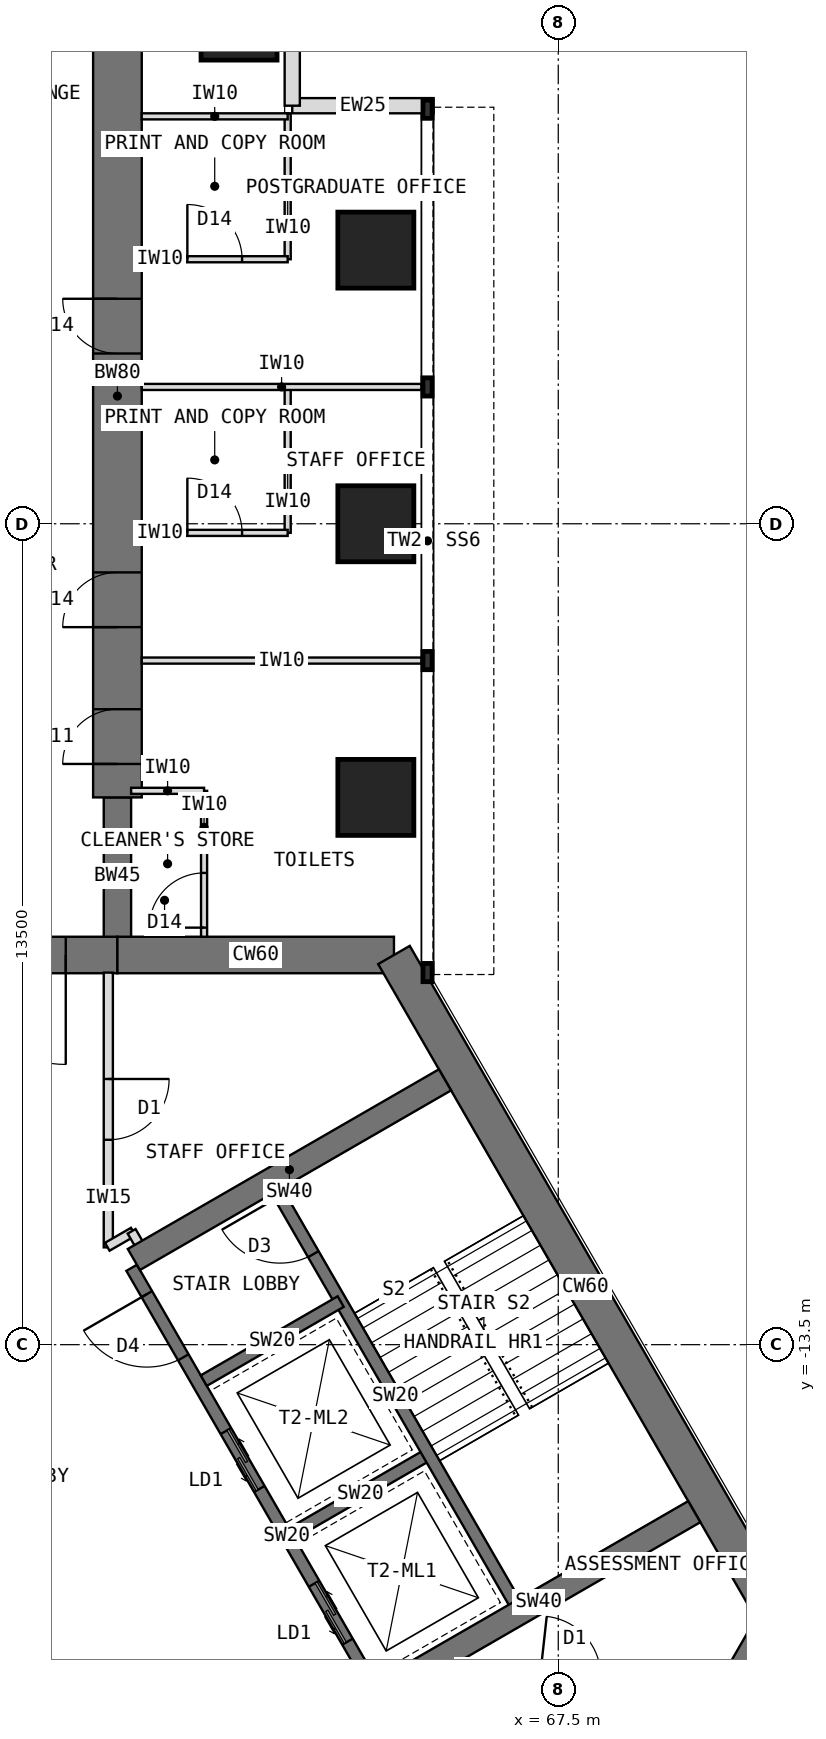
"""IFC4 building model, lengths in metres.
Left out: names, types, materials, properties, quantities, classifications, styles, units other than length and angle.
Written with IfcOpenShell. Run it as: python <this file> out.ifc"""

import sys

from ifc_helpers import new_model, si_unit, direction, frame, frame_2d, origin, origin_2d, place, context, subcontext, project, spatial, rectangle, extrude, element, fill, save


model = new_model("IFC4")
c1 = context("Model", 3, precision=1e-05, world=origin(), true_north=direction((0.0, 1.0)))
c2 = subcontext(c1, "Body", "Model", "MODEL_VIEW")
j1 = project(units=[si_unit("LENGTHUNIT", "METRE"), si_unit("PLANEANGLEUNIT", "RADIAN")], contexts=[c1])
p1 = place(None, origin())
s1 = spatial("IfcSite", under=j1, at=p1, CompositionType="ELEMENT")
p2 = place(p1, origin())
s2 = spatial("IfcBuilding", under=s1, at=p2, CompositionType="ELEMENT")
p3 = place(p2, frame((0.0, 0.0, 145.5)))
s3 = spatial("IfcBuildingStorey", under=s2, at=p3, CompositionType="ELEMENT", Elevation=145.5)
p4 = place(p3, frame((64.798, -7.092, 0.0), z_axis=(0.0, 0.0, 1.0), x_axis=(-1.0, 0.0, 0.0)))
e1 = element("IfcWall", 1, at=p4, inside=s3, PredefinedType="SHEAR", context=c2, shape_type="SweptSolid", body=[
    extrude(rectangle(XDim=4.548, YDim=0.6, at=frame_2d((2.274, 0.0))), origin(), (0.0, 0.0, 1.0), 4.0),
])
p5 = place(p3, frame((60.25, -7.092, 0.0), z_axis=(0.0, 0.0, 1.0), x_axis=(-1.0, 0.0, 0.0)))
e2 = element("IfcWall", 2, at=p5, inside=s3, PredefinedType="SHEAR", context=c2, shape_type="SweptSolid", body=[
    extrude(rectangle(XDim=3.5, YDim=0.6, at=frame_2d((1.75, 0.0))), origin(), (0.0, 0.0, 1.0), 4.0),
])
p6 = place(p5, frame((0.85, 0.0, 0.0)))
e3 = element("IfcOpeningElement", 3, at=p6, cuts=e2, PredefinedType="OPENING", context=c2, shape_type="SweptSolid", body=[
    extrude(rectangle(XDim=1.8, YDim=2.1, at=frame_2d((0.9, 1.05))), frame((0.0, 0.31, 0.0), z_axis=(0.0, -1.0, 0.0), x_axis=(1.0, 0.0, 0.0)), (0.0, 0.0, 1.0), 0.62),
])
p7 = place(p3, frame((68.822, -21.939, 0.0), z_axis=(0.0, 0.0, 1.0), x_axis=(0.500024481964, 0.866011268655, 0.0)))
e4 = element("IfcWall", 4, at=p7, inside=s3, PredefinedType="SHEAR", context=c2, shape_type="SweptSolid", body=[
    extrude(rectangle(XDim=4.548, YDim=0.6, at=frame_2d((2.274, 0.0))), origin(), (0.0, 0.0, 1.0), 4.0),
])
p8 = place(p3, frame((71.096, -18.0, 0.0), z_axis=(0.0, 0.0, 1.0), x_axis=(-0.500005998175, 0.866021940709, 0.0)))
e5 = element("IfcWall", 5, at=p8, inside=s3, PredefinedType="SHEAR", context=c2, shape_type="SweptSolid", body=[
    extrude(rectangle(XDim=12.596, YDim=0.6, at=frame_2d((6.298, 0.0))), origin(), (0.0, 0.0, 1.0), 4.0),
])
p9 = place(p3, frame((60.25, -7.092, 0.0), z_axis=(0.0, 0.0, 1.0), x_axis=(0.0, 1.0, 0.0)))
e6 = element("IfcWall", 6, at=p9, inside=s3, PredefinedType="SHEAR", context=c2, shape_type="SweptSolid", body=[
    extrude(rectangle(XDim=2.592, YDim=0.45, at=frame_2d((1.296, 0.0))), origin(), (0.0, 0.0, 1.0), 4.0),
])
p10 = place(p3, frame((60.25, -4.5, 0.0), z_axis=(0.0, 0.0, 1.0), x_axis=(0.0, 1.0, 0.0)))
e7 = element("IfcWall", 7, at=p10, inside=s3, PredefinedType="SHEAR", context=c2, shape_type="SweptSolid", body=[
    extrude(rectangle(XDim=13.2, YDim=0.8, at=frame_2d((6.6, 0.0))), origin(), (0.0, 0.0, 1.0), 4.0),
])
p11 = place(p10, frame((0.55, 0.0, 0.0)))
e8 = element("IfcOpeningElement", 8, at=p11, cuts=e7, PredefinedType="OPENING", context=c2, shape_type="SweptSolid", body=[
    extrude(rectangle(XDim=0.9, YDim=2.1, at=frame_2d((0.45, 1.05))), frame((0.0, 0.41, 0.0), z_axis=(0.0, -1.0, 0.0), x_axis=(1.0, 0.0, 0.0)), (0.0, 0.0, 1.0), 0.82),
])
p12 = place(p10, frame((2.8, 0.0, 0.0)))
e9 = element("IfcOpeningElement", 9, at=p12, cuts=e7, PredefinedType="OPENING", context=c2, shape_type="SweptSolid", body=[
    extrude(rectangle(XDim=0.9, YDim=2.1, at=frame_2d((0.45, 1.05))), frame((0.0, 0.41, 0.0), z_axis=(0.0, -1.0, 0.0), x_axis=(1.0, 0.0, 0.0)), (0.0, 0.0, 1.0), 0.82),
])
p13 = place(p10, frame((7.3, 0.0, 0.0)))
e10 = element("IfcOpeningElement", 10, at=p13, cuts=e7, PredefinedType="OPENING", context=c2, shape_type="SweptSolid", body=[
    extrude(rectangle(XDim=0.9, YDim=2.1, at=frame_2d((0.45, 1.05))), frame((0.0, 0.41, 0.0), z_axis=(0.0, -1.0, 0.0), x_axis=(1.0, 0.0, 0.0)), (0.0, 0.0, 1.0), 0.82),
])
for number, where, z_axis, x_axis in (
    (11, (64.5, -4.5, 0.0), (0.0, 0.0, 1.0), (1.0, 0.0, 0.0)),
    (12, (64.5, 0.0, 0.0), (0.0, 0.0, 1.0), (1.0, 0.0, 0.0)),
    (13, (64.5, 4.5, 0.0), (0.0, 0.0, 1.0), (1.0, 0.0, 0.0)),
    (14, (62.25, 8.25, 0.0), (0.0, 0.0, 1.0), (1.0, 0.0, 0.0)),
):
    element("IfcColumn", number, at=place(p3, frame(where, z_axis=z_axis, x_axis=x_axis)), inside=s3, PredefinedType="COLUMN", context=c2, shape_type="SweptSolid", body=[
        extrude(rectangle(XDim=1.25, YDim=1.25, at=origin_2d()), origin(), (0.0, 0.0, 1.0), 4.0),
    ])
for number, where, z_axis, x_axis in (
    (15, (65.45, 6.875, 0.0), (0.0, 0.0, 1.0), (-1.0, 0.0, 0.0)),
    (16, (63.125, 6.875, 0.0), (0.0, 0.0, 1.0), (0.0, 1.0, 0.0)),
):
    element("IfcWall", number, at=place(p3, frame(where, z_axis=z_axis, x_axis=x_axis)), inside=s3, PredefinedType="STANDARD", context=c2, shape_type="SweptSolid", body=[
        extrude(rectangle(XDim=2.325, YDim=0.25, at=frame_2d((1.163, 0.0))), origin(), (0.0, 0.0, 1.0), 3.8),
    ])
p14 = place(p3, frame((64.484, -19.164, 0.0), z_axis=(0.0, 0.0, 1.0), x_axis=(-0.49999894854, 0.866026010844, 0.0)))
e17 = element("IfcWall", 17, at=p14, inside=s3, PredefinedType="SHEAR", context=c2, shape_type="SweptSolid", body=[
    extrude(rectangle(XDim=8.0, YDim=0.2, at=frame_2d((4.0, 0.0))), origin(), (0.0, 0.0, 1.0), 4.0),
])
p15 = place(p14, frame((6.3, 0.0, 0.0)))
e18 = element("IfcOpeningElement", 18, at=p15, cuts=e17, PredefinedType="OPENING", context=c2, shape_type="SweptSolid", body=[
    extrude(rectangle(XDim=1.2, YDim=2.1, at=frame_2d((0.6, 1.05))), frame((0.0, 0.11, 0.0), z_axis=(0.0, -1.0, 0.0), x_axis=(1.0, 0.0, 0.0)), (0.0, 0.0, 1.0), 0.22),
])
p16 = place(p14, frame((0.9, 0.0, 0.0)))
e19 = element("IfcOpeningElement", 19, at=p16, cuts=e17, PredefinedType="OPENING", context=c2, shape_type="SweptSolid", body=[
    extrude(rectangle(XDim=1.1, YDim=2.2, at=frame_2d((0.55, 1.1))), frame((0.0, 0.11, 0.0), z_axis=(0.0, -1.0, 0.0), x_axis=(1.0, 0.0, 0.0)), (0.0, 0.0, 1.0), 0.22),
])
p17 = place(p14, frame((3.8, 0.0, 0.0)))
e20 = element("IfcOpeningElement", 20, at=p17, cuts=e17, PredefinedType="OPENING", context=c2, shape_type="SweptSolid", body=[
    extrude(rectangle(XDim=1.1, YDim=2.2, at=frame_2d((0.55, 1.1))), frame((0.0, 0.11, 0.0), z_axis=(0.0, -1.0, 0.0), x_axis=(1.0, 0.0, 0.0)), (0.0, 0.0, 1.0), 0.22),
])
p18 = place(p3, frame((63.12, -16.603, 0.0), z_axis=(0.0, 0.0, 1.0), x_axis=(0.866062058628, 0.499936506574, 0.0)))
e21 = element("IfcWall", 21, at=p18, inside=s3, PredefinedType="SHEAR", context=c2, shape_type="SweptSolid", body=[
    extrude(rectangle(XDim=2.6, YDim=0.2, at=frame_2d((1.3, 0.0))), origin(), (0.0, 0.0, 1.0), 4.0),
])
p19 = place(p3, frame((61.67, -14.091, 0.0), z_axis=(0.0, 0.0, 1.0), x_axis=(0.86603858612, 0.49997716683, 0.0)))
e22 = element("IfcWall", 22, at=p19, inside=s3, PredefinedType="SHEAR", context=c2, shape_type="SweptSolid", body=[
    extrude(rectangle(XDim=2.6, YDim=0.2, at=frame_2d((1.3, 0.0))), origin(), (0.0, 0.0, 1.0), 4.0),
])
p20 = place(p3, frame((66.822, -17.814, 0.0), z_axis=(0.0, 0.0, 1.0), x_axis=(-0.49999894854, 0.866026010844, 0.0)))
e23 = element("IfcWall", 23, at=p20, inside=s3, PredefinedType="SHEAR", context=c2, shape_type="SweptSolid", body=[
    extrude(rectangle(XDim=8.0, YDim=0.2, at=frame_2d((4.0, 0.0))), origin(), (0.0, 0.0, 1.0), 4.0),
])
p21 = place(p20, frame((6.7, 0.0, 0.0)))
e24 = element("IfcOpeningElement", 24, at=p21, cuts=e23, PredefinedType="OPENING", context=c2, shape_type="SweptSolid", body=[
    extrude(rectangle(XDim=1.1, YDim=2.1, at=frame_2d((0.55, 1.05))), frame((0.0, 0.11, 0.0), z_axis=(0.0, -1.0, 0.0), x_axis=(1.0, 0.0, 0.0)), (0.0, 0.0, 1.0), 0.22),
])
p22 = place(p3, frame((60.52, -12.099, 0.0), z_axis=(0.0, 0.0, 1.0), x_axis=(0.866009424208, 0.500027676417, 0.0)))
e25 = element("IfcWall", 25, at=p22, inside=s3, PredefinedType="SHEAR", context=c2, shape_type="SweptSolid", body=[
    extrude(rectangle(XDim=5.908, YDim=0.4, at=frame_2d((2.954, 0.0))), origin(), (0.0, 0.0, 1.0), 4.0),
])
p23 = place(p3, frame((64.62, -19.201, 0.0), z_axis=(0.0, 0.0, 1.0), x_axis=(0.866027317282, 0.49999668571, 0.0)))
e26 = element("IfcWall", 26, at=p23, inside=s3, PredefinedType="SHEAR", context=c2, shape_type="SweptSolid", body=[
    extrude(rectangle(XDim=5.908, YDim=0.4, at=frame_2d((2.954, 0.0))), origin(), (0.0, 0.0, 1.0), 4.0),
])
for number, where, z_axis, x_axis in (
    (27, (60.65, -2.25, 0.0), (0.0, 0.0, 1.0), (1.0, 0.0, 0.0)),
    (28, (60.65, 2.25, 0.0), (0.0, 0.0, 1.0), (1.0, 0.0, 0.0)),
):
    element("IfcWall", number, at=place(p3, frame(where, z_axis=z_axis, x_axis=x_axis)), inside=s3, PredefinedType="PARTITIONING", context=c2, shape_type="SweptSolid", body=[
        extrude(rectangle(XDim=4.6, YDim=0.1, at=frame_2d((2.3, 0.0))), origin(), (0.0, 0.0, 1.0), 3.8),
    ])
p24 = place(p3, frame((63.05, -0.15, 0.0), z_axis=(0.0, 0.0, 1.0), x_axis=(0.0, 1.0, 0.0)))
e29 = element("IfcWall", 29, at=p24, inside=s3, PredefinedType="PARTITIONING", context=c2, shape_type="SweptSolid", body=[
    extrude(rectangle(XDim=2.4, YDim=0.1, at=frame_2d((1.2, 0.0))), origin(), (0.0, 0.0, 1.0), 3.8),
])
p25 = place(p3, frame((60.65, -0.15, 0.0), z_axis=(0.0, 0.0, 1.0), x_axis=(1.0, 0.0, 0.0)))
e30 = element("IfcWall", 30, at=p25, inside=s3, PredefinedType="PARTITIONING", context=c2, shape_type="SweptSolid", body=[
    extrude(rectangle(XDim=2.4, YDim=0.1, at=frame_2d((1.2, 0.0))), origin(), (0.0, 0.0, 1.0), 3.8),
])
p26 = place(p25, frame((0.75, 0.0, 0.0)))
e31 = element("IfcOpeningElement", 31, at=p26, cuts=e30, PredefinedType="OPENING", context=c2, shape_type="SweptSolid", body=[
    extrude(rectangle(XDim=0.9, YDim=2.1, at=frame_2d((0.45, 1.05))), frame((0.0, 0.06, 0.0), z_axis=(0.0, -1.0, 0.0), x_axis=(1.0, 0.0, 0.0)), (0.0, 0.0, 1.0), 0.12),
])
p27 = place(p3, frame((63.05, 4.35, 0.0), z_axis=(0.0, 0.0, 1.0), x_axis=(0.0, 1.0, 0.0)))
e32 = element("IfcWall", 32, at=p27, inside=s3, PredefinedType="PARTITIONING", context=c2, shape_type="SweptSolid", body=[
    extrude(rectangle(XDim=2.4, YDim=0.1, at=frame_2d((1.2, 0.0))), origin(), (0.0, 0.0, 1.0), 3.8),
])
p28 = place(p3, frame((60.65, 4.35, 0.0), z_axis=(0.0, 0.0, 1.0), x_axis=(1.0, 0.0, 0.0)))
e33 = element("IfcWall", 33, at=p28, inside=s3, PredefinedType="PARTITIONING", context=c2, shape_type="SweptSolid", body=[
    extrude(rectangle(XDim=2.4, YDim=0.1, at=frame_2d((1.2, 0.0))), origin(), (0.0, 0.0, 1.0), 3.8),
])
p29 = place(p28, frame((0.75, 0.0, 0.0)))
e34 = element("IfcOpeningElement", 34, at=p29, cuts=e33, PredefinedType="OPENING", context=c2, shape_type="SweptSolid", body=[
    extrude(rectangle(XDim=0.9, YDim=2.1, at=frame_2d((0.45, 1.05))), frame((0.0, 0.06, 0.0), z_axis=(0.0, -1.0, 0.0), x_axis=(1.0, 0.0, 0.0)), (0.0, 0.0, 1.0), 0.12),
])
p30 = place(p3, frame((60.65, 6.7, 0.0), z_axis=(0.0, 0.0, 1.0), x_axis=(1.0, 0.0, 0.0)))
e35 = element("IfcWall", 35, at=p30, inside=s3, PredefinedType="PARTITIONING", context=c2, shape_type="SweptSolid", body=[
    extrude(rectangle(XDim=2.4, YDim=0.1, at=frame_2d((1.2, 0.0))), origin(), (0.0, 0.0, 1.0), 3.8),
])
p31 = place(p3, frame((61.675, -6.792, 0.0), z_axis=(0.0, 0.0, 1.0), x_axis=(0.0, 1.0, 0.0)))
e36 = element("IfcWall", 36, at=p31, inside=s3, PredefinedType="PARTITIONING", context=c2, shape_type="SweptSolid", body=[
    extrude(rectangle(XDim=2.4, YDim=0.1, at=frame_2d((1.2, 0.0))), origin(), (0.0, 0.0, 1.0), 3.8),
])
p32 = place(p31, frame((0.15, 0.0, 0.0)))
e37 = element("IfcOpeningElement", 37, at=p32, cuts=e36, PredefinedType="OPENING", context=c2, shape_type="SweptSolid", body=[
    extrude(rectangle(XDim=0.9, YDim=2.1, at=frame_2d((0.45, 1.05))), frame((0.0, 0.06, 0.0), z_axis=(0.0, -1.0, 0.0), x_axis=(1.0, 0.0, 0.0)), (0.0, 0.0, 1.0), 0.12),
])
p33 = place(p3, frame((60.475, -4.392, 0.0), z_axis=(0.0, 0.0, 1.0), x_axis=(1.0, 0.0, 0.0)))
e38 = element("IfcWall", 38, at=p33, inside=s3, PredefinedType="PARTITIONING", context=c2, shape_type="SweptSolid", body=[
    extrude(rectangle(XDim=1.2, YDim=0.1, at=frame_2d((0.6, 0.0))), origin(), (0.0, 0.0, 1.0), 3.8),
])
p34 = place(p3, frame((60.1, -7.382, 0.0), z_axis=(0.0, 0.0, 1.0), x_axis=(0.0, -1.0, 0.0)))
e39 = element("IfcWall", 39, at=p34, inside=s3, PredefinedType="PARTITIONING", context=c2, shape_type="SweptSolid", body=[
    extrude(rectangle(XDim=4.519, YDim=0.15, at=frame_2d((2.259, 0.0))), origin(), (0.0, 0.0, 1.0), 3.8),
])
p35 = place(p34, frame((1.749, 0.0, 0.0)))
e40 = element("IfcOpeningElement", 40, at=p35, cuts=e39, PredefinedType="OPENING", context=c2, shape_type="SweptSolid", body=[
    extrude(rectangle(XDim=1.0, YDim=2.1, at=frame_2d((0.5, 1.05))), frame((0.0, 0.085, 0.0), z_axis=(0.0, -1.0, 0.0), x_axis=(1.0, 0.0, 0.0)), (0.0, 0.0, 1.0), 0.17),
])
p36 = place(p3, frame((60.083, -11.89, 0.0), z_axis=(0.0, 0.0, 1.0), x_axis=(0.865831790172, 0.50033519877, 0.0)))
e41 = element("IfcWall", 41, at=p36, inside=s3, PredefinedType="PARTITIONING", context=c2, shape_type="SweptSolid", body=[
    extrude(rectangle(XDim=0.494, YDim=0.15, at=frame_2d((0.247, 0.0))), origin(), (0.0, 0.0, 1.0), 3.8),
])
p37 = place(p3, frame((60.483, -11.635, 0.0), z_axis=(0.0, 0.0, 1.0), x_axis=(0.500230298122, -0.865892400268, 0.0)))
e42 = element("IfcWall", 42, at=p37, inside=s3, PredefinedType="PARTITIONING", context=c2, shape_type="SweptSolid", body=[
    extrude(rectangle(XDim=0.43, YDim=0.15, at=frame_2d((0.215, 0.0))), origin(), (0.0, 0.0, 1.0), 3.8),
])
p38 = place(p15, origin())
e43 = element("IfcDoor", 43, at=p38, inside=s3, OperationType="SINGLE_SWING_RIGHT", PredefinedType="DOOR", context=c2, shape_type="SweptSolid", body=[
    extrude(rectangle(XDim=1.2, YDim=2.1, at=frame_2d((0.6, 1.05))), frame((0.0, 0.025, 0.0), z_axis=(0.0, -1.0, 0.0), x_axis=(1.0, 0.0, 0.0)), (0.0, 0.0, 1.0), 0.05),
])
fill(e18, e43)
p39 = place(p16, origin())
e44 = element("IfcDoor", 44, at=p39, inside=s3, OperationType="DOUBLE_DOOR_SLIDING", PredefinedType="DOOR", context=c2, shape_type="SweptSolid", body=[
    extrude(rectangle(XDim=1.1, YDim=2.2, at=frame_2d((0.55, 1.1))), frame((0.0, 0.025, 0.0), z_axis=(0.0, -1.0, 0.0), x_axis=(1.0, 0.0, 0.0)), (0.0, 0.0, 1.0), 0.05),
])
fill(e19, e44)
p40 = place(p17, origin())
e45 = element("IfcDoor", 45, at=p40, inside=s3, OperationType="DOUBLE_DOOR_SLIDING", PredefinedType="DOOR", context=c2, shape_type="SweptSolid", body=[
    extrude(rectangle(XDim=1.1, YDim=2.2, at=frame_2d((0.55, 1.1))), frame((0.0, 0.025, 0.0), z_axis=(0.0, -1.0, 0.0), x_axis=(1.0, 0.0, 0.0)), (0.0, 0.0, 1.0), 0.05),
])
fill(e20, e45)
p41 = place(p21, origin())
e46 = element("IfcDoor", 46, at=p41, inside=s3, OperationType="SINGLE_SWING_RIGHT", PredefinedType="DOOR", context=c2, shape_type="SweptSolid", body=[
    extrude(rectangle(XDim=1.1, YDim=2.1, at=frame_2d((0.55, 1.05))), frame((0.0, 0.025, 0.0), z_axis=(0.0, -1.0, 0.0), x_axis=(1.0, 0.0, 0.0)), (0.0, 0.0, 1.0), 0.05),
])
fill(e24, e46)
p42 = place(p6, origin())
e47 = element("IfcDoor", 47, at=p42, inside=s3, OperationType="DOUBLE_DOOR_DOUBLE_SWING", PredefinedType="DOOR", context=c2, shape_type="SweptSolid", body=[
    extrude(rectangle(XDim=1.72, YDim=2.06, at=frame_2d((0.9, 1.03))), frame((0.0, 0.025, 0.0), z_axis=(0.0, -1.0, 0.0), x_axis=(1.0, 0.0, 0.0)), (0.0, 0.0, 1.0), 0.05),
    extrude(rectangle(XDim=0.04, YDim=2.1, at=frame_2d((0.02, 1.05))), frame((0.0, 0.3, 0.0), z_axis=(0.0, -1.0, 0.0), x_axis=(1.0, 0.0, 0.0)), (0.0, 0.0, 1.0), 0.6),
    extrude(rectangle(XDim=0.04, YDim=2.1, at=frame_2d((1.78, 1.05))), frame((0.0, 0.3, 0.0), z_axis=(0.0, -1.0, 0.0), x_axis=(1.0, 0.0, 0.0)), (0.0, 0.0, 1.0), 0.6),
    extrude(rectangle(XDim=1.72, YDim=0.04, at=frame_2d((0.9, 2.08))), frame((0.0, 0.3, 0.0), z_axis=(0.0, -1.0, 0.0), x_axis=(1.0, 0.0, 0.0)), (0.0, 0.0, 1.0), 0.6),
])
fill(e3, e47)
p43 = place(p26, origin())
e48 = element("IfcDoor", 48, at=p43, inside=s3, OperationType="SINGLE_SWING_LEFT", PredefinedType="DOOR", context=c2, shape_type="SweptSolid", body=[
    extrude(rectangle(XDim=0.9, YDim=2.1, at=frame_2d((0.45, 1.05))), frame((0.0, 0.025, 0.0), z_axis=(0.0, -1.0, 0.0), x_axis=(1.0, 0.0, 0.0)), (0.0, 0.0, 1.0), 0.05),
])
fill(e31, e48)
p44 = place(p29, origin())
e49 = element("IfcDoor", 49, at=p44, inside=s3, OperationType="SINGLE_SWING_LEFT", PredefinedType="DOOR", context=c2, shape_type="SweptSolid", body=[
    extrude(rectangle(XDim=0.9, YDim=2.1, at=frame_2d((0.45, 1.05))), frame((0.0, 0.025, 0.0), z_axis=(0.0, -1.0, 0.0), x_axis=(1.0, 0.0, 0.0)), (0.0, 0.0, 1.0), 0.05),
])
fill(e34, e49)
p45 = place(p32, origin())
e50 = element("IfcDoor", 50, at=p45, inside=s3, OperationType="SINGLE_SWING_LEFT", PredefinedType="DOOR", context=c2, shape_type="SweptSolid", body=[
    extrude(rectangle(XDim=0.9, YDim=2.1, at=frame_2d((0.45, 1.05))), frame((0.0, 0.025, 0.0), z_axis=(0.0, -1.0, 0.0), x_axis=(1.0, 0.0, 0.0)), (0.0, 0.0, 1.0), 0.05),
])
fill(e37, e50)
p46 = place(p35, origin())
e51 = element("IfcDoor", 51, at=p46, inside=s3, OperationType="SINGLE_SWING_LEFT", PredefinedType="DOOR", context=c2, shape_type="SweptSolid", body=[
    extrude(rectangle(XDim=1.0, YDim=2.1, at=frame_2d((0.5, 1.05))), frame((0.0, 0.025, 0.0), z_axis=(0.0, -1.0, 0.0), x_axis=(1.0, 0.0, 0.0)), (0.0, 0.0, 1.0), 0.05),
])
fill(e40, e51)
p47 = place(p11, origin())
e52 = element("IfcDoor", 52, at=p47, inside=s3, OperationType="SINGLE_SWING_LEFT", PredefinedType="DOOR", context=c2, shape_type="SweptSolid", body=[
    extrude(rectangle(XDim=0.82, YDim=2.06, at=frame_2d((0.45, 1.03))), frame((0.0, 0.025, 0.0), z_axis=(0.0, -1.0, 0.0), x_axis=(1.0, 0.0, 0.0)), (0.0, 0.0, 1.0), 0.05),
    extrude(rectangle(XDim=0.04, YDim=2.1, at=frame_2d((0.02, 1.05))), frame((0.0, 0.4, 0.0), z_axis=(0.0, -1.0, 0.0), x_axis=(1.0, 0.0, 0.0)), (0.0, 0.0, 1.0), 0.8),
    extrude(rectangle(XDim=0.04, YDim=2.1, at=frame_2d((0.88, 1.05))), frame((0.0, 0.4, 0.0), z_axis=(0.0, -1.0, 0.0), x_axis=(1.0, 0.0, 0.0)), (0.0, 0.0, 1.0), 0.8),
    extrude(rectangle(XDim=0.82, YDim=0.04, at=frame_2d((0.45, 2.08))), frame((0.0, 0.4, 0.0), z_axis=(0.0, -1.0, 0.0), x_axis=(1.0, 0.0, 0.0)), (0.0, 0.0, 1.0), 0.8),
])
fill(e8, e52)
p48 = place(p12, origin())
e53 = element("IfcDoor", 53, at=p48, inside=s3, OperationType="SINGLE_SWING_LEFT", PredefinedType="DOOR", context=c2, shape_type="SweptSolid", body=[
    extrude(rectangle(XDim=0.82, YDim=2.06, at=frame_2d((0.45, 1.03))), frame((0.0, 0.025, 0.0), z_axis=(0.0, -1.0, 0.0), x_axis=(1.0, 0.0, 0.0)), (0.0, 0.0, 1.0), 0.05),
    extrude(rectangle(XDim=0.04, YDim=2.1, at=frame_2d((0.02, 1.05))), frame((0.0, 0.4, 0.0), z_axis=(0.0, -1.0, 0.0), x_axis=(1.0, 0.0, 0.0)), (0.0, 0.0, 1.0), 0.8),
    extrude(rectangle(XDim=0.04, YDim=2.1, at=frame_2d((0.88, 1.05))), frame((0.0, 0.4, 0.0), z_axis=(0.0, -1.0, 0.0), x_axis=(1.0, 0.0, 0.0)), (0.0, 0.0, 1.0), 0.8),
    extrude(rectangle(XDim=0.82, YDim=0.04, at=frame_2d((0.45, 2.08))), frame((0.0, 0.4, 0.0), z_axis=(0.0, -1.0, 0.0), x_axis=(1.0, 0.0, 0.0)), (0.0, 0.0, 1.0), 0.8),
])
fill(e9, e53)
p49 = place(p13, origin())
e54 = element("IfcDoor", 54, at=p49, inside=s3, OperationType="SINGLE_SWING_RIGHT", PredefinedType="DOOR", context=c2, shape_type="SweptSolid", body=[
    extrude(rectangle(XDim=0.82, YDim=2.06, at=frame_2d((0.45, 1.03))), frame((0.0, 0.025, 0.0), z_axis=(0.0, -1.0, 0.0), x_axis=(1.0, 0.0, 0.0)), (0.0, 0.0, 1.0), 0.05),
    extrude(rectangle(XDim=0.04, YDim=2.1, at=frame_2d((0.02, 1.05))), frame((0.0, 0.4, 0.0), z_axis=(0.0, -1.0, 0.0), x_axis=(1.0, 0.0, 0.0)), (0.0, 0.0, 1.0), 0.8),
    extrude(rectangle(XDim=0.04, YDim=2.1, at=frame_2d((0.88, 1.05))), frame((0.0, 0.4, 0.0), z_axis=(0.0, -1.0, 0.0), x_axis=(1.0, 0.0, 0.0)), (0.0, 0.0, 1.0), 0.8),
    extrude(rectangle(XDim=0.82, YDim=0.04, at=frame_2d((0.45, 2.08))), frame((0.0, 0.4, 0.0), z_axis=(0.0, -1.0, 0.0), x_axis=(1.0, 0.0, 0.0)), (0.0, 0.0, 1.0), 0.8),
])
fill(e10, e54)
save(model, sys.argv[1])
